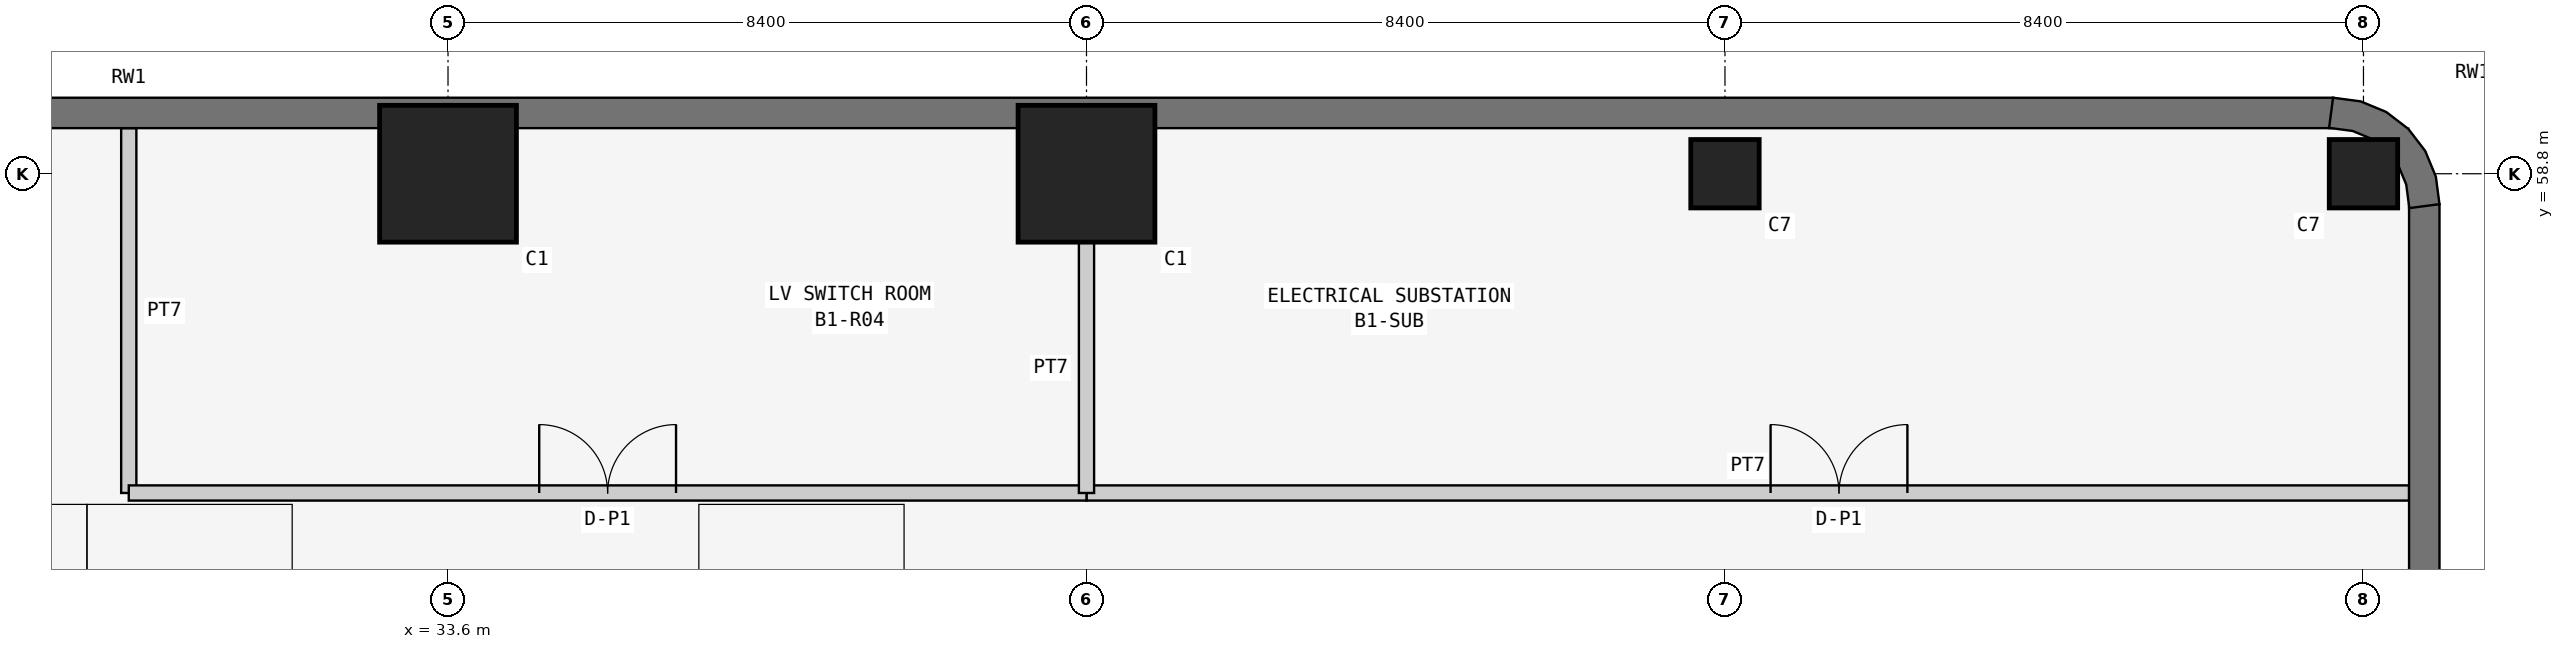
"""IFC4 building model, lengths in metres.
Left out: names, types, materials, properties, quantities, classifications, styles, units other than length and angle.
Written with IfcOpenShell. Run it as: python <this file> out.ifc"""

import sys

from ifc_helpers import new_model, si_unit, direction, frame, frame_2d, origin, origin_2d, place, context, subcontext, project, spatial, polyline, rectangle, outline, extrude, element, fill, save


model = new_model("IFC4")
c1 = context("Model", 3, precision=1e-05, world=origin(), true_north=direction((0.0, 1.0)))
c2 = subcontext(c1, "Body", "Model", "MODEL_VIEW")
j1 = project(units=[si_unit("LENGTHUNIT", "METRE"), si_unit("PLANEANGLEUNIT", "RADIAN")], contexts=[c1])
p1 = place(None, origin())
s1 = spatial("IfcSite", under=j1, at=p1, CompositionType="ELEMENT")
p2 = place(p1, origin())
s2 = spatial("IfcBuilding", under=s1, at=p2, CompositionType="ELEMENT")
p3 = place(p2, frame((0.0, 0.0, -3.6)))
s3 = spatial("IfcBuildingStorey", under=s2, at=p3, CompositionType="ELEMENT", Elevation=-3.6)
for number, where, z_axis, x_axis in (
    (1, (33.6, 58.8, 0.0), (0.0, 0.0, 1.0), (1.0, 0.0, 0.0)),
    (2, (42.0, 58.8, 0.0), (0.0, 0.0, 1.0), (1.0, 0.0, 0.0)),
):
    element("IfcColumn", number, at=place(p3, frame(where, z_axis=z_axis, x_axis=x_axis)), inside=s3, PredefinedType="COLUMN", context=c2, shape_type="SweptSolid", body=[
        extrude(rectangle(XDim=1.8, YDim=1.8, at=origin_2d()), origin(), (0.0, 0.0, 1.0), 3.6),
    ])
for number, where, z_axis, x_axis in (
    (3, (50.4, 58.8, 0.0), (0.0, 0.0, 1.0), (1.0, 0.0, 0.0)),
    (4, (58.8, 58.8, 0.0), (0.0, 0.0, 1.0), (1.0, 0.0, 0.0)),
):
    element("IfcColumn", number, at=place(p3, frame(where, z_axis=z_axis, x_axis=x_axis)), inside=s3, PredefinedType="COLUMN", context=c2, shape_type="SweptSolid", body=[
        extrude(rectangle(XDim=0.9, YDim=0.9, at=origin_2d()), origin(), (0.0, 0.0, 1.0), 3.6),
    ])
p4 = place(p3, frame((59.6, -16.4, 0.0), z_axis=(0.0, 0.0, 1.0), x_axis=(0.0, 1.0, 0.0)))
e5 = element("IfcWall", 5, at=p4, inside=s3, PredefinedType="SOLIDWALL", context=c2, shape_type="SweptSolid", body=[
    extrude(rectangle(XDim=74.8, YDim=0.4, at=frame_2d((37.4, 0.0))), origin(), (0.0, 0.0, 1.0), 3.6),
])
p5 = place(p3, frame((58.4, 59.6, 0.0), z_axis=(0.0, 0.0, 1.0), x_axis=(-1.0, 0.0, 0.0)))
e6 = element("IfcWall", 6, at=p5, inside=s3, PredefinedType="SOLIDWALL", context=c2, shape_type="SweptSolid", body=[
    extrude(rectangle(XDim=58.0, YDim=0.4, at=frame_2d((29.0, 0.0))), origin(), (0.0, 0.0, 1.0), 3.6),
])
p6 = place(p3, origin())
e7 = element("IfcWall", 7, at=p6, inside=s3, PredefinedType="SOLIDWALL", context=c2, shape_type="SweptSolid", body=[
    extrude(outline(polyline([(58.4, 59.8), (58.347, 59.4), (58.374, 59.4), (58.658, 59.363), (58.898, 59.263), (59.104, 59.104), (59.263, 58.898), (59.363, 58.658), (59.4, 58.374), (59.4, 58.347), (59.8, 58.4), (59.752, 58.762), (59.612, 59.1), (59.39, 59.39), (59.1, 59.612), (58.762, 59.752), (58.4, 59.8)])), origin(), (0.0, 0.0, 1.0), 3.6),
])
p7 = place(p3, frame((42.0, 54.6, 0.0), z_axis=(0.0, 0.0, 1.0), x_axis=(1.0, 0.0, 0.0)))
e8 = element("IfcWall", 8, at=p7, inside=s3, PredefinedType="PARTITIONING", context=c2, shape_type="SweptSolid", body=[
    extrude(rectangle(XDim=17.4, YDim=0.2, at=frame_2d((8.7, 0.0))), origin(), (0.0, 0.0, 1.0), 3.3),
])
p8 = place(p7, frame((9.0, 0.0, 0.0)))
e9 = element("IfcOpeningElement", 9, at=p8, cuts=e8, PredefinedType="OPENING", context=c2, shape_type="SweptSolid", body=[
    extrude(rectangle(XDim=1.8, YDim=2.4, at=frame_2d((0.9, 1.2))), frame((0.0, 0.11, 0.0), z_axis=(0.0, -1.0, 0.0), x_axis=(1.0, 0.0, 0.0)), (0.0, 0.0, 1.0), 0.22),
])
p9 = place(p3, frame((29.4, 59.4, 0.0), z_axis=(0.0, 0.0, 1.0), x_axis=(0.0, -1.0, 0.0)))
e10 = element("IfcWall", 10, at=p9, inside=s3, PredefinedType="PARTITIONING", context=c2, shape_type="SweptSolid", body=[
    extrude(rectangle(XDim=4.8, YDim=0.2, at=frame_2d((2.4, 0.0))), origin(), (0.0, 0.0, 1.0), 2.688),
])
p10 = place(p3, frame((29.4, 54.6, 0.0), z_axis=(0.0, 0.0, 1.0), x_axis=(1.0, 0.0, 0.0)))
e11 = element("IfcWall", 11, at=p10, inside=s3, PredefinedType="PARTITIONING", context=c2, shape_type="SweptSolid", body=[
    extrude(rectangle(XDim=12.6, YDim=0.2, at=frame_2d((6.3, 0.0))), origin(), (0.0, 0.0, 1.0), 3.3),
])
p11 = place(p10, frame((5.4, 0.0, 0.0)))
e12 = element("IfcOpeningElement", 12, at=p11, cuts=e11, PredefinedType="OPENING", context=c2, shape_type="SweptSolid", body=[
    extrude(rectangle(XDim=1.8, YDim=2.4, at=frame_2d((0.9, 1.2))), frame((0.0, 0.11, 0.0), z_axis=(0.0, -1.0, 0.0), x_axis=(1.0, 0.0, 0.0)), (0.0, 0.0, 1.0), 0.22),
])
p12 = place(p3, frame((42.0, 54.6, 0.0), z_axis=(0.0, 0.0, 1.0), x_axis=(0.0, 1.0, 0.0)))
e13 = element("IfcWall", 13, at=p12, inside=s3, PredefinedType="PARTITIONING", context=c2, shape_type="SweptSolid", body=[
    extrude(rectangle(XDim=3.3, YDim=0.2, at=frame_2d((1.65, 0.0))), origin(), (0.0, 0.0, 1.0), 2.388),
])
p13 = place(p8, origin())
e14 = element("IfcDoor", 14, at=p13, inside=s3, OperationType="DOUBLE_DOOR_SINGLE_SWING", PredefinedType="DOOR", context=c2, shape_type="SweptSolid", body=[
    extrude(rectangle(XDim=1.8, YDim=2.4, at=frame_2d((0.9, 1.2))), frame((0.0, 0.025, 0.0), z_axis=(0.0, -1.0, 0.0), x_axis=(1.0, 0.0, 0.0)), (0.0, 0.0, 1.0), 0.05),
])
fill(e9, e14)
p14 = place(p11, origin())
e15 = element("IfcDoor", 15, at=p14, inside=s3, OperationType="DOUBLE_DOOR_SINGLE_SWING", PredefinedType="DOOR", context=c2, shape_type="SweptSolid", body=[
    extrude(rectangle(XDim=1.8, YDim=2.4, at=frame_2d((0.9, 1.2))), frame((0.0, 0.025, 0.0), z_axis=(0.0, -1.0, 0.0), x_axis=(1.0, 0.0, 0.0)), (0.0, 0.0, 1.0), 0.05),
])
fill(e12, e15)
save(model, sys.argv[1])
